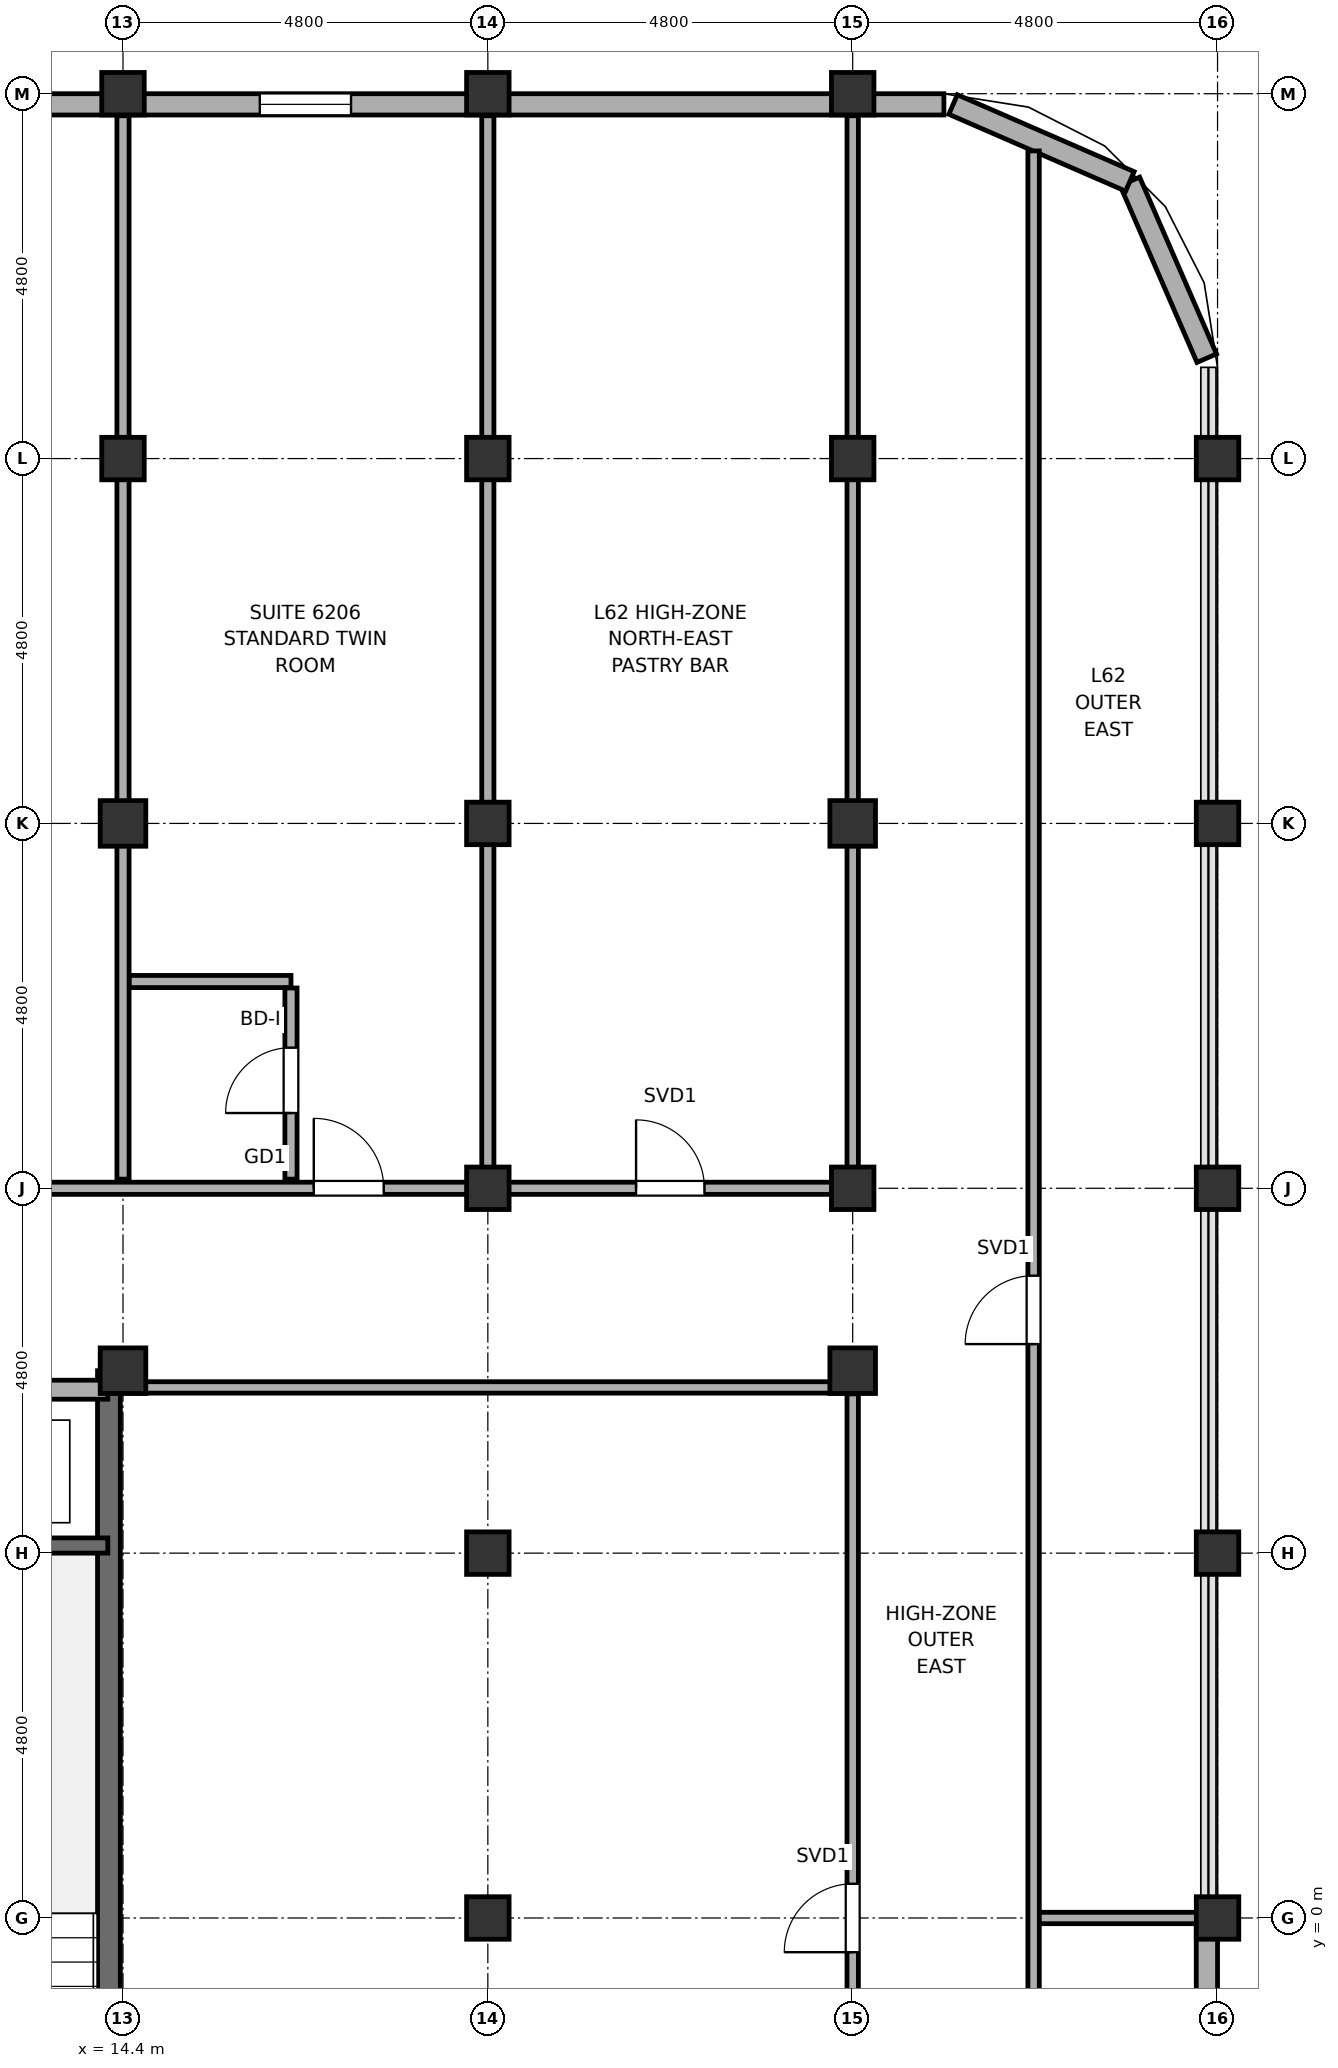
"""IFC4 building model, lengths in metres.
Left out: names, types, materials, properties, quantities, classifications, styles, units other than length and angle.
Written with IfcOpenShell. Run it as: python <this file> out.ifc"""

import sys

from ifc_helpers import new_model, si_unit, direction, frame, frame_2d, origin, origin_2d, place, context, subcontext, project, spatial, rectangle, hollow_rectangle, hollow_circle, extrude, element, fill, save


model = new_model("IFC4")
c1 = context("Model", 3, precision=1e-05, world=origin(), true_north=direction((0.0, 1.0)))
c2 = subcontext(c1, "Body", "Model", "MODEL_VIEW")
j1 = project(units=[si_unit("LENGTHUNIT", "METRE"), si_unit("PLANEANGLEUNIT", "RADIAN")], contexts=[c1])
p1 = place(None, origin())
s1 = spatial("IfcSite", under=j1, at=p1, CompositionType="ELEMENT")
p2 = place(p1, origin())
s2 = spatial("IfcBuilding", under=s1, at=p2, CompositionType="ELEMENT")
p3 = place(p2, frame((0.0, 0.0, 249.25)))
s3 = spatial("IfcBuildingStorey", under=s2, at=p3, CompositionType="ELEMENT", Elevation=249.25)
for number, where, z_axis, x_axis in (
    (1, (14.4, 7.2, 0.0), (0.0, 0.0, 1.0), (1.0, 0.0, 0.0)),
    (2, (14.4, 14.4, 0.0), (0.0, 0.0, 1.0), (1.0, 0.0, 0.0)),
):
    element("IfcColumn", number, at=place(p3, frame(where, z_axis=z_axis, x_axis=x_axis)), inside=s3, PredefinedType="COLUMN", context=c2, shape_type="SweptSolid", body=[
        extrude(hollow_rectangle(XDim=0.6, YDim=0.6, WallThickness=0.028, at=origin_2d()), origin(), (0.0, 0.0, 1.0), 3.85),
    ])
for number, where, z_axis, x_axis in (
    (3, (14.4, 19.2, 0.0), (0.0, 0.0, 1.0), (1.0, 0.0, 0.0)),
    (4, (14.4, 24.0, 0.0), (0.0, 0.0, 1.0), (1.0, 0.0, 0.0)),
    (5, (19.2, 0.0, 0.0), (0.0, 0.0, 1.0), (1.0, 0.0, 0.0)),
    (6, (19.2, 4.8, 0.0), (0.0, 0.0, 1.0), (1.0, 0.0, 0.0)),
    (7, (19.2, 9.6, 0.0), (0.0, 0.0, 1.0), (1.0, 0.0, 0.0)),
    (8, (19.2, 14.4, 0.0), (0.0, 0.0, 1.0), (1.0, 0.0, 0.0)),
    (9, (19.2, 19.2, 0.0), (0.0, 0.0, 1.0), (1.0, 0.0, 0.0)),
    (10, (19.2, 24.0, 0.0), (0.0, 0.0, 1.0), (1.0, 0.0, 0.0)),
):
    element("IfcColumn", number, at=place(p3, frame(where, z_axis=z_axis, x_axis=x_axis)), inside=s3, PredefinedType="COLUMN", context=c2, shape_type="SweptSolid", body=[
        extrude(hollow_circle(Radius=0.28, WallThickness=0.025, at=origin_2d()), origin(), (0.0, 0.0, 1.0), 3.85),
    ])
p4 = place(p3, frame((24.0, 7.2, 0.0), z_axis=(0.0, 0.0, 1.0), x_axis=(1.0, 0.0, 0.0)))
e11 = element("IfcColumn", 11, at=p4, inside=s3, PredefinedType="COLUMN", context=c2, shape_type="SweptSolid", body=[
    extrude(hollow_rectangle(XDim=0.6, YDim=0.6, WallThickness=0.028, at=origin_2d()), origin(), (0.0, 0.0, 1.0), 3.85),
])
p5 = place(p3, frame((24.0, 9.6, 0.0), z_axis=(0.0, 0.0, 1.0), x_axis=(1.0, 0.0, 0.0)))
e12 = element("IfcColumn", 12, at=p5, inside=s3, PredefinedType="COLUMN", context=c2, shape_type="SweptSolid", body=[
    extrude(hollow_circle(Radius=0.28, WallThickness=0.025, at=origin_2d()), origin(), (0.0, 0.0, 1.0), 3.85),
])
p6 = place(p3, frame((24.0, 14.4, 0.0), z_axis=(0.0, 0.0, 1.0), x_axis=(1.0, 0.0, 0.0)))
e13 = element("IfcColumn", 13, at=p6, inside=s3, PredefinedType="COLUMN", context=c2, shape_type="SweptSolid", body=[
    extrude(hollow_rectangle(XDim=0.6, YDim=0.6, WallThickness=0.028, at=origin_2d()), origin(), (0.0, 0.0, 1.0), 3.85),
])
for number, where, z_axis, x_axis in (
    (14, (24.0, 19.2, 0.0), (0.0, 0.0, 1.0), (1.0, 0.0, 0.0)),
    (15, (24.0, 24.0, 0.0), (0.0, 0.0, 1.0), (1.0, 0.0, 0.0)),
    (16, (28.8, 0.0, 0.0), (0.0, 0.0, 1.0), (1.0, 0.0, 0.0)),
    (17, (28.8, 4.8, 0.0), (0.0, 0.0, 1.0), (1.0, 0.0, 0.0)),
    (18, (28.8, 9.6, 0.0), (0.0, 0.0, 1.0), (1.0, 0.0, 0.0)),
    (19, (28.8, 14.4, 0.0), (0.0, 0.0, 1.0), (1.0, 0.0, 0.0)),
    (20, (28.8, 19.2, 0.0), (0.0, 0.0, 1.0), (1.0, 0.0, 0.0)),
):
    element("IfcColumn", number, at=place(p3, frame(where, z_axis=z_axis, x_axis=x_axis)), inside=s3, PredefinedType="COLUMN", context=c2, shape_type="SweptSolid", body=[
        extrude(hollow_circle(Radius=0.28, WallThickness=0.025, at=origin_2d()), origin(), (0.0, 0.0, 1.0), 3.85),
    ])
p7 = place(p3, frame((14.215, -7.2, -0.18), z_axis=(0.0, 0.0, 1.0), x_axis=(0.0, 1.0, 0.0)))
e21 = element("IfcWall", 21, at=p7, inside=s3, PredefinedType="SHEAR", context=c2, shape_type="SweptSolid", body=[
    extrude(rectangle(XDim=14.4, YDim=0.3, at=frame_2d((7.2, 0.0))), origin(), (0.0, 0.0, 1.0), 3.85),
])
p8 = place(p3, frame((28.658, 20.521, 0.0), z_axis=(0.0, 0.0, 1.0), x_axis=(-0.398792985289, 0.917040977756, 0.0)))
e22 = element("IfcWall", 22, at=p8, inside=s3, PredefinedType="SOLIDWALL", context=c2, shape_type="SweptSolid", body=[
    extrude(rectangle(XDim=2.536, YDim=0.28, at=frame_2d((1.268, 0.0))), origin(), (0.0, 0.0, 1.0), 2.27),
])
p9 = place(p3, frame((27.646, 22.847, 0.0), z_axis=(0.0, 0.0, 1.0), x_axis=(-0.917060872934, 0.398747232384, 0.0)))
e23 = element("IfcWall", 23, at=p9, inside=s3, PredefinedType="SOLIDWALL", context=c2, shape_type="SweptSolid", body=[
    extrude(rectangle(XDim=2.536, YDim=0.28, at=frame_2d((1.268, 0.0))), origin(), (0.0, 0.0, 1.0), 2.27),
])
p10 = place(p3, frame((4.75, 23.86, 0.0), z_axis=(0.0, 0.0, 1.0), x_axis=(1.0, 0.0, 0.0)))
e24 = element("IfcWall", 24, at=p10, inside=s3, PredefinedType="SOLIDWALL", context=c2, shape_type="SweptSolid", body=[
    extrude(rectangle(XDim=20.45, YDim=0.28, at=frame_2d((10.225, 0.0))), origin(), (0.0, 0.0, 1.0), 2.27),
])
p11 = place(p10, frame((11.45, 0.0, 0.75)))
e25 = element("IfcOpeningElement", 25, at=p11, cuts=e24, PredefinedType="OPENING", context=c2, shape_type="SweptSolid", body=[
    extrude(rectangle(XDim=1.2, YDim=1.15, at=frame_2d((0.6, 0.575))), frame((0.0, 0.155, 0.0), z_axis=(0.0, -1.0, 0.0), x_axis=(1.0, 0.0, 0.0)), (0.0, 0.0, 1.0), 0.31),
])
p12 = place(p3, frame((28.66, -15.6, 0.0), z_axis=(0.0, 0.0, 1.0), x_axis=(0.0, 1.0, 0.0)))
e26 = element("IfcWall", 26, at=p12, inside=s3, PredefinedType="SOLIDWALL", context=c2, shape_type="SweptSolid", body=[
    extrude(rectangle(XDim=15.58, YDim=0.28, at=frame_2d((7.79, 0.0))), origin(), (0.0, 0.0, 1.0), 2.27),
])
p13 = place(p12, frame((7.5, 0.0, 0.0)))
e27 = element("IfcOpeningElement", 27, at=p13, cuts=e26, PredefinedType="OPENING", context=c2, shape_type="SweptSolid", body=[
    extrude(rectangle(XDim=1.8, YDim=2.02, at=frame_2d((0.9, 1.01))), frame((0.0, 0.155, 0.0), z_axis=(0.0, -1.0, 0.0), x_axis=(1.0, 0.0, 0.0)), (0.0, 0.0, 1.0), 0.31),
])
p14 = place(p12, frame((12.45, 0.0, 0.75)))
e28 = element("IfcOpeningElement", 28, at=p14, cuts=e26, PredefinedType="OPENING", context=c2, shape_type="SweptSolid", body=[
    extrude(rectangle(XDim=1.5, YDim=1.15, at=frame_2d((0.75, 0.575))), frame((0.0, 0.155, 0.0), z_axis=(0.0, -1.0, 0.0), x_axis=(1.0, 0.0, 0.0)), (0.0, 0.0, 1.0), 0.31),
])
p15 = place(p3, frame((4.8, 6.95, 0.0), z_axis=(0.0, 0.0, 1.0), x_axis=(1.0, 0.0, 0.0)))
e29 = element("IfcWall", 29, at=p15, inside=s3, PredefinedType="SOLIDWALL", context=c2, shape_type="SweptSolid", body=[
    extrude(rectangle(XDim=9.4, YDim=0.25, at=frame_2d((4.7, 0.0))), origin(), (0.0, 0.0, 1.0), 2.27),
])
p16 = place(p15, frame((3.5, 0.0, 0.0)))
e30 = element("IfcOpeningElement", 30, at=p16, cuts=e29, PredefinedType="OPENING", context=c2, shape_type="SweptSolid", body=[
    extrude(rectangle(XDim=1.2, YDim=2.2, at=frame_2d((0.6, 1.1))), frame((0.0, 0.14, 0.0), z_axis=(0.0, -1.0, 0.0), x_axis=(1.0, 0.0, 0.0)), (0.0, 0.0, 1.0), 0.28),
])
p17 = place(p3, frame((10.55, 4.9, -0.18), z_axis=(0.0, 0.0, 1.0), x_axis=(1.0, 0.0, 0.0)))
e31 = element("IfcWall", 31, at=p17, inside=s3, PredefinedType="SOLIDWALL", context=c2, shape_type="SweptSolid", body=[
    extrude(rectangle(XDim=3.65, YDim=0.2, at=frame_2d((1.825, 0.0))), origin(), (0.0, 0.0, 1.0), 3.85),
])
p18 = place(p3, frame((26.38, 0.0, 0.0), z_axis=(0.0, 0.0, 1.0), x_axis=(1.0, 0.0, 0.0)))
e32 = element("IfcWall", 32, at=p18, inside=s3, PredefinedType="PARTITIONING", context=c2, shape_type="SweptSolid", body=[
    extrude(rectangle(XDim=2.25, YDim=0.15, at=frame_2d((1.125, 0.0))), origin(), (0.0, 0.0, 1.0), 3.12),
])
p19 = place(p3, frame((14.52, 6.98, 0.0), z_axis=(0.0, 0.0, 1.0), x_axis=(1.0, 0.0, 0.0)))
e33 = element("IfcWall", 33, at=p19, inside=s3, PredefinedType="PARTITIONING", context=c2, shape_type="SweptSolid", body=[
    extrude(rectangle(XDim=9.4, YDim=0.15, at=frame_2d((4.7, 0.0))), origin(), (0.0, 0.0, 1.0), 2.27),
])
p20 = place(p3, frame((-23.92, 9.6, 0.0), z_axis=(0.0, 0.0, 1.0), x_axis=(1.0, 0.0, 0.0)))
e34 = element("IfcWall", 34, at=p20, inside=s3, PredefinedType="PARTITIONING", context=c2, shape_type="SweptSolid", body=[
    extrude(rectangle(XDim=47.84, YDim=0.16, at=frame_2d((23.92, 0.0))), origin(), (0.0, 0.0, 1.0), 2.27),
])
p21 = place(p20, frame((1.87, 0.0, 0.0)))
e35 = element("IfcOpeningElement", 35, at=p21, cuts=e34, PredefinedType="OPENING", context=c2, shape_type="SweptSolid", body=[
    extrude(rectangle(XDim=0.9, YDim=2.1, at=frame_2d((0.45, 1.05))), frame((0.0, 0.095, 0.0), z_axis=(0.0, -1.0, 0.0), x_axis=(1.0, 0.0, 0.0)), (0.0, 0.0, 1.0), 0.19),
])
p22 = place(p20, frame((45.07, 0.0, 0.0)))
e36 = element("IfcOpeningElement", 36, at=p22, cuts=e34, PredefinedType="OPENING", context=c2, shape_type="SweptSolid", body=[
    extrude(rectangle(XDim=0.9, YDim=2.1, at=frame_2d((0.45, 1.05))), frame((0.0, 0.095, 0.0), z_axis=(0.0, -1.0, 0.0), x_axis=(1.0, 0.0, 0.0)), (0.0, 0.0, 1.0), 0.19),
])
p23 = place(p20, frame((5.98, 0.0, 0.0)))
e37 = element("IfcOpeningElement", 37, at=p23, cuts=e34, PredefinedType="OPENING", context=c2, shape_type="SweptSolid", body=[
    extrude(rectangle(XDim=0.9, YDim=2.1, at=frame_2d((0.45, 1.05))), frame((0.0, 0.095, 0.0), z_axis=(0.0, -1.0, 0.0), x_axis=(1.0, 0.0, 0.0)), (0.0, 0.0, 1.0), 0.19),
])
p24 = place(p20, frame((7.87, 0.0, 0.0)))
e38 = element("IfcOpeningElement", 38, at=p24, cuts=e34, PredefinedType="OPENING", context=c2, shape_type="SweptSolid", body=[
    extrude(rectangle(XDim=0.9, YDim=2.1, at=frame_2d((0.45, 1.05))), frame((0.0, 0.095, 0.0), z_axis=(0.0, -1.0, 0.0), x_axis=(1.0, 0.0, 0.0)), (0.0, 0.0, 1.0), 0.19),
])
p25 = place(p20, frame((10.395, 0.0, 0.0)))
e39 = element("IfcOpeningElement", 39, at=p25, cuts=e34, PredefinedType="OPENING", context=c2, shape_type="SweptSolid", body=[
    extrude(rectangle(XDim=0.92, YDim=2.15, at=frame_2d((0.46, 1.075))), frame((0.0, 0.095, 0.0), z_axis=(0.0, -1.0, 0.0), x_axis=(1.0, 0.0, 0.0)), (0.0, 0.0, 1.0), 0.19),
])
p26 = place(p20, frame((17.325, 0.0, 0.0)))
e40 = element("IfcOpeningElement", 40, at=p26, cuts=e34, PredefinedType="OPENING", context=c2, shape_type="SweptSolid", body=[
    extrude(rectangle(XDim=0.92, YDim=2.15, at=frame_2d((0.46, 1.075))), frame((0.0, 0.095, 0.0), z_axis=(0.0, -1.0, 0.0), x_axis=(1.0, 0.0, 0.0)), (0.0, 0.0, 1.0), 0.19),
])
p27 = place(p20, frame((19.995, 0.0, 0.0)))
e41 = element("IfcOpeningElement", 41, at=p27, cuts=e34, PredefinedType="OPENING", context=c2, shape_type="SweptSolid", body=[
    extrude(rectangle(XDim=0.92, YDim=2.15, at=frame_2d((0.46, 1.075))), frame((0.0, 0.095, 0.0), z_axis=(0.0, -1.0, 0.0), x_axis=(1.0, 0.0, 0.0)), (0.0, 0.0, 1.0), 0.19),
])
p28 = place(p20, frame((25.87, 0.0, 0.0)))
e42 = element("IfcOpeningElement", 42, at=p28, cuts=e34, PredefinedType="OPENING", context=c2, shape_type="SweptSolid", body=[
    extrude(rectangle(XDim=0.9, YDim=2.1, at=frame_2d((0.45, 1.05))), frame((0.0, 0.095, 0.0), z_axis=(0.0, -1.0, 0.0), x_axis=(1.0, 0.0, 0.0)), (0.0, 0.0, 1.0), 0.19),
])
p29 = place(p20, frame((40.83, 0.0, 0.0)))
e43 = element("IfcOpeningElement", 43, at=p29, cuts=e34, PredefinedType="OPENING", context=c2, shape_type="SweptSolid", body=[
    extrude(rectangle(XDim=0.92, YDim=2.15, at=frame_2d((0.46, 1.075))), frame((0.0, 0.095, 0.0), z_axis=(0.0, -1.0, 0.0), x_axis=(1.0, 0.0, 0.0)), (0.0, 0.0, 1.0), 0.19),
])
p30 = place(p3, frame((14.48, 12.32, 0.0), z_axis=(0.0, 0.0, 1.0), x_axis=(1.0, 0.0, 0.0)))
e44 = element("IfcWall", 44, at=p30, inside=s3, PredefinedType="PARTITIONING", context=c2, shape_type="SweptSolid", body=[
    extrude(rectangle(XDim=2.13, YDim=0.16, at=frame_2d((1.065, 0.0))), origin(), (0.0, 0.0, 1.0), 3.12),
])
p31 = place(p3, frame((14.4, 9.72, 0.0), z_axis=(0.0, 0.0, 1.0), x_axis=(0.0, 1.0, 0.0)))
e45 = element("IfcWall", 45, at=p31, inside=s3, PredefinedType="PARTITIONING", context=c2, shape_type="SweptSolid", body=[
    extrude(rectangle(XDim=13.99, YDim=0.16, at=frame_2d((6.995, 0.0))), origin(), (0.0, 0.0, 1.0), 2.27),
])
p32 = place(p3, frame((16.61, 9.72, 0.0), z_axis=(0.0, 0.0, 1.0), x_axis=(0.0, 1.0, 0.0)))
e46 = element("IfcWall", 46, at=p32, inside=s3, PredefinedType="PARTITIONING", context=c2, shape_type="SweptSolid", body=[
    extrude(rectangle(XDim=2.515, YDim=0.16, at=frame_2d((1.258, 0.0))), origin(), (0.0, 0.0, 1.0), 2.27),
])
p33 = place(p32, frame((0.87, 0.0, 0.0)))
e47 = element("IfcOpeningElement", 47, at=p33, cuts=e46, PredefinedType="OPENING", context=c2, shape_type="SweptSolid", body=[
    extrude(rectangle(XDim=0.86, YDim=2.1, at=frame_2d((0.43, 1.05))), frame((0.0, 0.095, 0.0), z_axis=(0.0, -1.0, 0.0), x_axis=(1.0, 0.0, 0.0)), (0.0, 0.0, 1.0), 0.19),
])
p34 = place(p3, frame((19.2, 9.72, 0.0), z_axis=(0.0, 0.0, 1.0), x_axis=(0.0, 1.0, 0.0)))
e48 = element("IfcWall", 48, at=p34, inside=s3, PredefinedType="PARTITIONING", context=c2, shape_type="SweptSolid", body=[
    extrude(rectangle(XDim=13.99, YDim=0.16, at=frame_2d((6.995, 0.0))), origin(), (0.0, 0.0, 1.0), 2.27),
])
p35 = place(p3, frame((24.0, -6.835, 0.0), z_axis=(0.0, 0.0, 1.0), x_axis=(0.0, 1.0, 0.0)))
e49 = element("IfcWall", 49, at=p35, inside=s3, PredefinedType="PARTITIONING", context=c2, shape_type="SweptSolid", body=[
    extrude(rectangle(XDim=13.73, YDim=0.15, at=frame_2d((6.865, 0.0))), origin(), (0.0, 0.0, 1.0), 2.27),
])
p36 = place(p35, frame((6.385, 0.0, 0.0)))
e50 = element("IfcOpeningElement", 50, at=p36, cuts=e49, PredefinedType="OPENING", context=c2, shape_type="SweptSolid", body=[
    extrude(rectangle(XDim=0.9, YDim=2.1, at=frame_2d((0.45, 1.05))), frame((0.0, 0.09, 0.0), z_axis=(0.0, -1.0, 0.0), x_axis=(1.0, 0.0, 0.0)), (0.0, 0.0, 1.0), 0.18),
])
p37 = place(p3, frame((24.0, 9.72, 0.0), z_axis=(0.0, 0.0, 1.0), x_axis=(0.0, 1.0, 0.0)))
e51 = element("IfcWall", 51, at=p37, inside=s3, PredefinedType="PARTITIONING", context=c2, shape_type="SweptSolid", body=[
    extrude(rectangle(XDim=13.99, YDim=0.15, at=frame_2d((6.995, 0.0))), origin(), (0.0, 0.0, 1.0), 2.27),
])
p38 = place(p3, frame((26.38, -18.447, 0.0), z_axis=(0.0, 0.0, 1.0), x_axis=(0.0, 1.0, 0.0)))
e52 = element("IfcWall", 52, at=p38, inside=s3, PredefinedType="PARTITIONING", context=c2, shape_type="SweptSolid", body=[
    extrude(rectangle(XDim=41.695, YDim=0.15, at=frame_2d((20.847, 0.0))), origin(), (0.0, 0.0, 1.0), 2.27),
])
p39 = place(p38, frame((9.997, 0.0, 0.0)))
e53 = element("IfcOpeningElement", 53, at=p39, cuts=e52, PredefinedType="OPENING", context=c2, shape_type="SweptSolid", body=[
    extrude(rectangle(XDim=0.9, YDim=2.1, at=frame_2d((0.45, 1.05))), frame((0.0, 0.09, 0.0), z_axis=(0.0, -1.0, 0.0), x_axis=(1.0, 0.0, 0.0)), (0.0, 0.0, 1.0), 0.18),
])
p40 = place(p38, frame((25.997, 0.0, 0.0)))
e54 = element("IfcOpeningElement", 54, at=p40, cuts=e52, PredefinedType="OPENING", context=c2, shape_type="SweptSolid", body=[
    extrude(rectangle(XDim=0.9, YDim=2.1, at=frame_2d((0.45, 1.05))), frame((0.0, 0.09, 0.0), z_axis=(0.0, -1.0, 0.0), x_axis=(1.0, 0.0, 0.0)), (0.0, 0.0, 1.0), 0.18),
])
p41 = place(p11, origin())
e55 = element("IfcWindow", 55, at=p41, inside=s3, PartitioningType="SINGLE_PANEL", PredefinedType="WINDOW", context=c2, shape_type="SweptSolid", body=[
    extrude(rectangle(XDim=1.2, YDim=1.15, at=frame_2d((0.6, 0.575))), frame((0.0, 0.03, 0.0), z_axis=(0.0, -1.0, 0.0), x_axis=(1.0, 0.0, 0.0)), (0.0, 0.0, 1.0), 0.06),
])
fill(e25, e55)
p42 = place(p36, origin())
e56 = element("IfcDoor", 56, at=p42, inside=s3, OperationType="SINGLE_SWING_RIGHT", PredefinedType="DOOR", context=c2, shape_type="SweptSolid", body=[
    extrude(rectangle(XDim=0.9, YDim=2.1, at=frame_2d((0.45, 1.05))), frame((0.0, 0.025, 0.0), z_axis=(0.0, -1.0, 0.0), x_axis=(1.0, 0.0, 0.0)), (0.0, 0.0, 1.0), 0.05),
])
fill(e50, e56)
p43 = place(p22, origin())
e57 = element("IfcDoor", 57, at=p43, inside=s3, OperationType="SINGLE_SWING_LEFT", PredefinedType="DOOR", context=c2, shape_type="SweptSolid", body=[
    extrude(rectangle(XDim=0.9, YDim=2.1, at=frame_2d((0.45, 1.05))), frame((0.0, 0.025, 0.0), z_axis=(0.0, -1.0, 0.0), x_axis=(1.0, 0.0, 0.0)), (0.0, 0.0, 1.0), 0.05),
])
fill(e36, e57)
p44 = place(p40, origin())
e58 = element("IfcDoor", 58, at=p44, inside=s3, OperationType="SINGLE_SWING_RIGHT", PredefinedType="DOOR", context=c2, shape_type="SweptSolid", body=[
    extrude(rectangle(XDim=0.9, YDim=2.1, at=frame_2d((0.45, 1.05))), frame((0.0, 0.025, 0.0), z_axis=(0.0, -1.0, 0.0), x_axis=(1.0, 0.0, 0.0)), (0.0, 0.0, 1.0), 0.05),
])
fill(e54, e58)
p45 = place(p29, origin())
e59 = element("IfcDoor", 59, at=p45, inside=s3, OperationType="SINGLE_SWING_RIGHT", PredefinedType="DOOR", context=c2, shape_type="SweptSolid", body=[
    extrude(rectangle(XDim=0.92, YDim=2.15, at=frame_2d((0.46, 1.075))), frame((0.0, 0.025, 0.0), z_axis=(0.0, -1.0, 0.0), x_axis=(1.0, 0.0, 0.0)), (0.0, 0.0, 1.0), 0.05),
])
fill(e43, e59)
p46 = place(p33, origin())
e60 = element("IfcDoor", 60, at=p46, inside=s3, OperationType="SINGLE_SWING_RIGHT", PredefinedType="DOOR", context=c2, shape_type="SweptSolid", body=[
    extrude(rectangle(XDim=0.86, YDim=2.1, at=frame_2d((0.43, 1.05))), frame((0.0, 0.025, 0.0), z_axis=(0.0, -1.0, 0.0), x_axis=(1.0, 0.0, 0.0)), (0.0, 0.0, 1.0), 0.05),
])
fill(e47, e60)
save(model, sys.argv[1])
